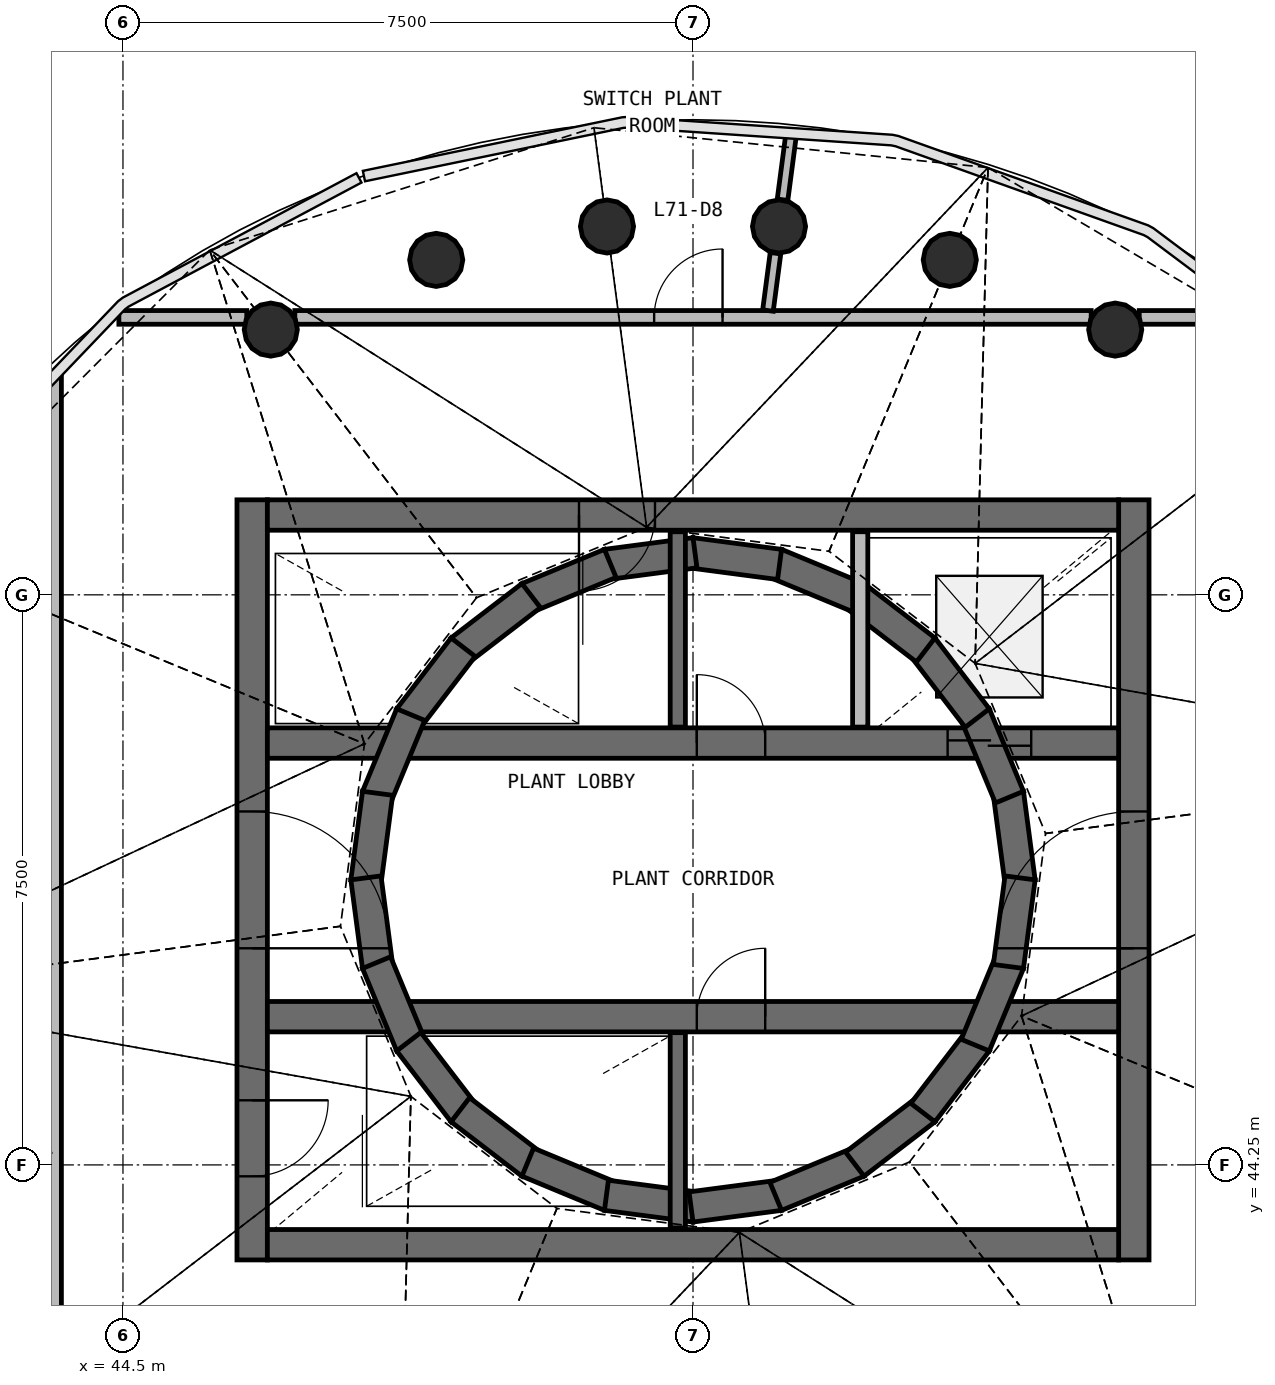
"""IFC4 building model, lengths in metres.
Left out: names, types, materials, properties, quantities, classifications, styles, units other than length and angle.
Written with IfcOpenShell. Run it as: python <this file> out.ifc"""

import sys

from ifc_helpers import new_model, si_unit, direction, frame, frame_2d, origin, origin_2d, place, context, subcontext, project, spatial, rectangle, circle, extrude, source, transform, mapped, element, fill, save


model = new_model("IFC4")
c1 = context("Model", 3, precision=1e-05, world=origin(), true_north=direction((0.0, 1.0)))
c2 = subcontext(c1, "Body", "Model", "MODEL_VIEW")
j1 = project(units=[si_unit("LENGTHUNIT", "METRE"), si_unit("PLANEANGLEUNIT", "RADIAN")], contexts=[c1])
p1 = place(None, origin())
s1 = spatial("IfcSite", under=j1, at=p1, CompositionType="ELEMENT")
p2 = place(p1, origin())
s2 = spatial("IfcBuilding", under=s1, at=p2, CompositionType="ELEMENT")
p3 = place(p2, frame((0.0, 0.0, 287.1)))
s3 = spatial("IfcBuildingStorey", under=s2, at=p3, CompositionType="ELEMENT", Elevation=287.1)
p4 = place(p3, frame((57.8, 43.0, 0.0), z_axis=(0.0, 0.0, 1.0), x_axis=(0.0, 1.0, 0.0)))
e1 = element("IfcWall", 1, at=p4, inside=s3, PredefinedType="SHEAR", context=c2, shape_type="SweptSolid", body=[
    extrude(rectangle(XDim=10.0, YDim=0.4, at=frame_2d((5.0, 0.0))), origin(), (0.0, 0.0, 1.0), 3.5),
])
p5 = place(p4, frame((4.1, 0.0, 0.0)))
e2 = element("IfcOpeningElement", 2, at=p5, cuts=e1, PredefinedType="OPENING", context=c2, shape_type="SweptSolid", body=[
    extrude(rectangle(XDim=1.8, YDim=2.1, at=frame_2d((0.9, 1.05))), frame((0.0, 0.21, 0.0), z_axis=(0.0, -1.0, 0.0), x_axis=(1.0, 0.0, 0.0)), (0.0, 0.0, 1.0), 0.42),
])
p6 = place(p3, frame((46.2, 53.0, 0.0), z_axis=(0.0, 0.0, 1.0), x_axis=(0.0, -1.0, 0.0)))
e3 = element("IfcWall", 3, at=p6, inside=s3, PredefinedType="SHEAR", context=c2, shape_type="SweptSolid", body=[
    extrude(rectangle(XDim=10.0, YDim=0.4, at=frame_2d((5.0, 0.0))), origin(), (0.0, 0.0, 1.0), 3.5),
])
p7 = place(p6, frame((4.1, 0.0, 0.0)))
e4 = element("IfcOpeningElement", 4, at=p7, cuts=e3, PredefinedType="OPENING", context=c2, shape_type="SweptSolid", body=[
    extrude(rectangle(XDim=1.8, YDim=2.1, at=frame_2d((0.9, 1.05))), frame((0.0, 0.21, 0.0), z_axis=(0.0, -1.0, 0.0), x_axis=(1.0, 0.0, 0.0)), (0.0, 0.0, 1.0), 0.42),
])
p8 = place(p6, frame((7.9, 0.0, 0.0)))
e5 = element("IfcOpeningElement", 5, at=p8, cuts=e3, PredefinedType="OPENING", context=c2, shape_type="SweptSolid", body=[
    extrude(rectangle(XDim=1.0, YDim=2.1, at=frame_2d((0.5, 1.05))), frame((0.0, 0.21, 0.0), z_axis=(0.0, -1.0, 0.0), x_axis=(1.0, 0.0, 0.0)), (0.0, 0.0, 1.0), 0.42),
])
p9 = place(p3, frame((46.4, 43.2, 0.0), z_axis=(0.0, 0.0, 1.0), x_axis=(1.0, 0.0, 0.0)))
e6 = element("IfcWall", 6, at=p9, inside=s3, PredefinedType="SHEAR", context=c2, shape_type="SweptSolid", body=[
    extrude(rectangle(XDim=11.2, YDim=0.4, at=frame_2d((5.6, 0.0))), origin(), (0.0, 0.0, 1.0), 3.5),
])
p10 = place(p3, frame((57.6, 52.8, 0.0), z_axis=(0.0, 0.0, 1.0), x_axis=(-1.0, 0.0, 0.0)))
e7 = element("IfcWall", 7, at=p10, inside=s3, PredefinedType="SHEAR", context=c2, shape_type="SweptSolid", body=[
    extrude(rectangle(XDim=11.2, YDim=0.4, at=frame_2d((5.6, 0.0))), origin(), (0.0, 0.0, 1.0), 3.5),
])
p11 = place(p10, frame((6.1, 0.0, 0.0)))
e8 = element("IfcOpeningElement", 8, at=p11, cuts=e7, PredefinedType="OPENING", context=c2, shape_type="SweptSolid", body=[
    extrude(rectangle(XDim=1.0, YDim=2.1, at=frame_2d((0.5, 1.05))), frame((0.0, 0.21, 0.0), z_axis=(0.0, -1.0, 0.0), x_axis=(1.0, 0.0, 0.0)), (0.0, 0.0, 1.0), 0.42),
])
p12 = place(p3, frame((46.4, 49.8, 0.0), z_axis=(0.0, 0.0, 1.0), x_axis=(1.0, 0.0, 0.0)))
e9 = element("IfcWall", 9, at=p12, inside=s3, PredefinedType="SHEAR", context=c2, shape_type="SweptSolid", body=[
    extrude(rectangle(XDim=11.2, YDim=0.4, at=frame_2d((5.6, 0.0))), origin(), (0.0, 0.0, 1.0), 3.5),
])
p13 = place(p12, frame((8.95, 0.0, 0.0)))
e10 = element("IfcOpeningElement", 10, at=p13, cuts=e9, PredefinedType="OPENING", context=c2, shape_type="SweptSolid", body=[
    extrude(rectangle(XDim=1.1, YDim=2.1, at=frame_2d((0.55, 1.05))), frame((0.0, 0.21, 0.0), z_axis=(0.0, -1.0, 0.0), x_axis=(1.0, 0.0, 0.0)), (0.0, 0.0, 1.0), 0.42),
])
p14 = place(p12, frame((5.65, 0.0, 0.0)))
e11 = element("IfcOpeningElement", 11, at=p14, cuts=e9, PredefinedType="OPENING", context=c2, shape_type="SweptSolid", body=[
    extrude(rectangle(XDim=0.9, YDim=2.1, at=frame_2d((0.45, 1.05))), frame((0.0, 0.21, 0.0), z_axis=(0.0, -1.0, 0.0), x_axis=(1.0, 0.0, 0.0)), (0.0, 0.0, 1.0), 0.42),
])
p15 = place(p3, frame((46.4, 46.2, 0.0), z_axis=(0.0, 0.0, 1.0), x_axis=(1.0, 0.0, 0.0)))
e12 = element("IfcWall", 12, at=p15, inside=s3, PredefinedType="SHEAR", context=c2, shape_type="SweptSolid", body=[
    extrude(rectangle(XDim=11.2, YDim=0.4, at=frame_2d((5.6, 0.0))), origin(), (0.0, 0.0, 1.0), 3.5),
])
p16 = place(p15, frame((5.65, 0.0, 0.0)))
e13 = element("IfcOpeningElement", 13, at=p16, cuts=e12, PredefinedType="OPENING", context=c2, shape_type="SweptSolid", body=[
    extrude(rectangle(XDim=0.9, YDim=2.1, at=frame_2d((0.45, 1.05))), frame((0.0, 0.21, 0.0), z_axis=(0.0, -1.0, 0.0), x_axis=(1.0, 0.0, 0.0)), (0.0, 0.0, 1.0), 0.42),
])
m1 = source(origin(), c2, "Body", "SweptSolid", [
    extrude(circle(Radius=0.35, at=origin_2d()), origin(), (0.0, 0.0, 1.0), 3.573),
])
p17 = place(p3, frame((57.555, 55.24, 0.159), z_axis=(-0.270857062246, -0.352920465817, 0.89559119951), x_axis=(0.793297249859, -0.608834520511, 0.0)))
e14 = element("IfcColumn", 14, at=p17, inside=s3, PredefinedType="COLUMN", context=c2, shape_type="MappedRepresentation", body=[
    mapped(m1, transform((0.0, 0.0, 0.0), scale=1.0)),
])
m2 = source(origin(), c2, "Body", "SweptSolid", [
    extrude(circle(Radius=0.35, at=origin_2d()), origin(), (0.0, 0.0, 1.0), 3.505),
])
p18 = place(p3, frame((55.379, 56.157, 0.146), z_axis=(-0.156165944661, -0.376971495318, 0.912964779959), x_axis=(0.923862861885, -0.382723676339, 0.0)))
e15 = element("IfcColumn", 15, at=p18, inside=s3, PredefinedType="COLUMN", context=c2, shape_type="MappedRepresentation", body=[
    mapped(m2, transform((0.0, 0.0, 0.0), scale=1.0)),
])
m3 = source(origin(), c2, "Body", "SweptSolid", [
    extrude(circle(Radius=0.35, at=origin_2d()), origin(), (0.0, 0.0, 1.0), 3.46),
])
p19 = place(p3, frame((53.132, 56.596, 0.136), z_axis=(-0.049603484084, -0.377141710425, 0.924826267266), x_axis=(0.991461239084, -0.130401730791, 0.0)))
e16 = element("IfcColumn", 16, at=p19, inside=s3, PredefinedType="COLUMN", context=c2, shape_type="MappedRepresentation", body=[
    mapped(m3, transform((0.0, 0.0, 0.0), scale=1.0)),
])
m4 = source(origin(), c2, "Body", "SweptSolid", [
    extrude(circle(Radius=0.35, at=origin_2d()), origin(), (0.0, 0.0, 1.0), 3.437),
])
p20 = place(p3, frame((50.868, 56.596, 0.131), z_axis=(0.047591855306, -0.361840165562, 0.931024548492), x_axis=(0.991460918944, 0.130404164839, 0.0)))
e17 = element("IfcColumn", 17, at=p20, inside=s3, PredefinedType="COLUMN", context=c2, shape_type="MappedRepresentation", body=[
    mapped(m4, transform((0.0, 0.0, 0.0), scale=1.0)),
])
m5 = source(origin(), c2, "Body", "SweptSolid", [
    extrude(circle(Radius=0.35, at=origin_2d()), origin(), (0.0, 0.0, 1.0), 3.426),
])
p21 = place(p3, frame((48.621, 56.157, 0.128), z_axis=(0.136544060372, -0.329743928676, 0.934143811775), x_axis=(0.923919496495, 0.382586936521, 0.0)))
e18 = element("IfcColumn", 18, at=p21, inside=s3, PredefinedType="COLUMN", context=c2, shape_type="MappedRepresentation", body=[
    mapped(m5, transform((0.0, 0.0, 0.0), scale=1.0)),
])
m6 = source(origin(), c2, "Body", "SweptSolid", [
    extrude(circle(Radius=0.35, at=origin_2d()), origin(), (0.0, 0.0, 1.0), 3.418),
])
p22 = place(p3, frame((46.445, 55.24, 0.126), z_axis=(0.214058059643, -0.278911152121, 0.9361558184), x_axis=(0.793295635134, 0.608836624455, 0.0)))
e19 = element("IfcColumn", 19, at=p22, inside=s3, PredefinedType="COLUMN", context=c2, shape_type="MappedRepresentation", body=[
    mapped(m6, transform((0.0, 0.0, 0.0), scale=1.0)),
])
m7 = source(origin(), c2, "Body", "SweptSolid", [
    extrude(circle(Radius=0.35, at=origin_2d()), origin(), (0.0, 0.0, 1.0), 3.481),
])
p23 = place(p3, frame((42.871, 51.781, 0.141), z_axis=(0.363634980693, -0.150573636171, 0.919291673467), x_axis=(0.382577370091, 0.923923457811, 0.0)))
e20 = element("IfcColumn", 20, at=p23, inside=s3, PredefinedType="COLUMN", context=c2, shape_type="MappedRepresentation", body=[
    mapped(m7, transform((0.0, 0.0, 0.0), scale=1.0)),
])
m8 = source(origin(), c2, "Body", "SweptSolid", [
    extrude(circle(Radius=0.35, at=origin_2d()), origin(), (0.0, 0.0, 1.0), 3.564),
])
p24 = place(p3, frame((41.969, 49.321, 0.157), z_axis=(0.436555493474, -0.057472157387, 0.897839769805), x_axis=(0.130522924776, 0.991445291535, 0.0)))
e21 = element("IfcColumn", 21, at=p24, inside=s3, PredefinedType="COLUMN", context=c2, shape_type="MappedRepresentation", body=[
    mapped(m8, transform((0.0, 0.0, 0.0), scale=1.0)),
])
m9 = source(origin(), c2, "Body", "SweptSolid", [
    extrude(circle(Radius=0.35, at=origin_2d()), origin(), (0.0, 0.0, 1.0), 3.67),
])
p25 = place(p3, frame((41.969, 46.679, 0.174), z_axis=(0.485581289046, 0.063923783394, 0.871851226784), x_axis=(-0.130517750651, 0.991445972691, 0.0)))
e22 = element("IfcColumn", 22, at=p25, inside=s3, PredefinedType="COLUMN", context=c2, shape_type="MappedRepresentation", body=[
    mapped(m9, transform((0.0, 0.0, 0.0), scale=1.0)),
])
m10 = source(origin(), c2, "Body", "SweptSolid", [
    extrude(circle(Radius=0.35, at=origin_2d()), origin(), (0.0, 0.0, 1.0), 3.721),
])
p26 = place(p3, frame((42.871, 44.219, 0.181), z_axis=(0.471368199064, 0.19520050003, 0.860063245174), x_axis=(-0.38260546681, 0.923911823047, 0.0)))
e23 = element("IfcColumn", 23, at=p26, inside=s3, PredefinedType="COLUMN", context=c2, shape_type="MappedRepresentation", body=[
    mapped(m10, transform((0.0, 0.0, 0.0), scale=1.0)),
])
for number, where, z_axis, x_axis in (
    (24, (56.303, 47.974, 3.5), (0.0, 0.0, 1.0), (-0.131, 0.991, 0.0)),
    (25, (56.164, 49.089, 3.5), (0.0, 0.0, 1.0), (-0.383, 0.924, 0.0)),
    (26, (55.74, 50.129, 3.5), (0.0, 0.0, 1.0), (-0.609, 0.793, 0.0)),
    (27, (55.061, 51.024, 3.5), (0.0, 0.0, 1.0), (-0.793, 0.609, 0.0)),
    (28, (54.174, 51.714, 3.5), (0.0, 0.0, 1.0), (-0.924, 0.383, 0.0)),
    (29, (53.139, 52.15, 3.5), (0.0, 0.0, 1.0), (-0.991, 0.131, 0.0)),
    (30, (52.026, 52.303, 3.5), (0.0, 0.0, 1.0), (-0.991, -0.131, 0.0)),
    (31, (50.911, 52.164, 3.5), (0.0, 0.0, 1.0), (-0.924, -0.383, 0.0)),
    (32, (49.871, 51.74, 3.5), (0.0, 0.0, 1.0), (-0.793, -0.609, 0.0)),
    (33, (48.976, 51.061, 3.5), (0.0, 0.0, 1.0), (-0.609, -0.793, 0.0)),
    (34, (48.286, 50.174, 3.5), (0.0, 0.0, 1.0), (-0.383, -0.924, 0.0)),
    (35, (47.85, 49.139, 3.5), (0.0, 0.0, 1.0), (-0.131, -0.991, 0.0)),
    (36, (47.697, 48.026, 3.5), (0.0, 0.0, 1.0), (0.131, -0.991, 0.0)),
    (37, (47.836, 46.911, 3.5), (0.0, 0.0, 1.0), (0.383, -0.924, 0.0)),
    (38, (48.26, 45.871, 3.5), (0.0, 0.0, 1.0), (0.609, -0.793, 0.0)),
    (39, (48.939, 44.976, 3.5), (0.0, 0.0, 1.0), (0.793, -0.609, 0.0)),
    (40, (49.826, 44.286, 3.5), (0.0, 0.0, 1.0), (0.924, -0.383, 0.0)),
    (41, (50.861, 43.85, 3.5), (0.0, 0.0, 1.0), (0.991, -0.131, 0.0)),
    (42, (51.974, 43.697, 3.5), (0.0, 0.0, 1.0), (0.991, 0.131, 0.0)),
    (43, (53.089, 43.836, 3.5), (0.0, 0.0, 1.0), (0.924, 0.383, 0.0)),
    (44, (54.129, 44.26, 3.5), (0.0, 0.0, 1.0), (0.793, 0.609, 0.0)),
    (45, (55.024, 44.939, 3.5), (0.0, 0.0, 1.0), (0.609, 0.793, 0.0)),
    (46, (55.714, 45.826, 3.5), (0.0, 0.0, 1.0), (0.383, 0.924, 0.0)),
    (47, (56.15, 46.861, 3.5), (0.0, 0.0, 1.0), (0.131, 0.991, 0.0)),
):
    element("IfcWall", number, at=place(p3, frame(where, z_axis=z_axis, x_axis=x_axis)), inside=s3, PredefinedType="SOLIDWALL", context=c2, shape_type="SweptSolid", body=[
        extrude(rectangle(XDim=1.175, YDim=0.4, at=frame_2d((0.587, 0.0))), origin(), (0.0, 0.0, 1.0), 2.6),
    ])
for number, where, z_axis, x_axis in (
    (48, (51.8, 43.42, 0.0), (0.0, 0.0, 1.0), (0.0, 1.0, 0.0)),
    (49, (51.8, 50.01, 0.0), (0.0, 0.0, 1.0), (0.0, 1.0, 0.0)),
    (50, (54.2, 52.58, 0.0), (0.0, 0.0, 1.0), (0.0, -1.0, 0.0)),
):
    element("IfcWall", number, at=place(p3, frame(where, z_axis=z_axis, x_axis=x_axis)), inside=s3, PredefinedType="SOLIDWALL", context=c2, shape_type="SweptSolid", body=[
        extrude(rectangle(XDim=2.57, YDim=0.2, at=frame_2d((1.285, 0.0))), origin(), (0.0, 0.0, 1.0), 2.5),
    ])
p27 = place(p3, frame((43.6, 54.677, 0.0), z_axis=(0.0, 0.0, 1.0), x_axis=(0.0, -1.0, 0.0)))
e51 = element("IfcWall", 51, at=p27, inside=s3, PredefinedType="PARTITIONING", context=c2, shape_type="SweptSolid", body=[
    extrude(rectangle(XDim=13.354, YDim=0.18, at=frame_2d((6.677, 0.0))), origin(), (0.0, 0.0, 1.0), 2.62),
])
p28 = place(p3, frame((46.761, 55.4, 0.0), z_axis=(0.0, 0.0, 1.0), x_axis=(1.0, 0.0, 0.0)))
e52 = element("IfcWall", 52, at=p28, inside=s3, PredefinedType="PARTITIONING", context=c2, shape_type="SweptSolid", body=[
    extrude(rectangle(XDim=10.478, YDim=0.18, at=frame_2d((5.239, 0.0))), origin(), (0.0, 0.0, 1.0), 2.62),
])
p29 = place(p28, frame((4.728, 0.0, 0.0)))
e53 = element("IfcOpeningElement", 53, at=p29, cuts=e52, PredefinedType="OPENING", context=c2, shape_type="SweptSolid", body=[
    extrude(rectangle(XDim=0.9, YDim=2.1, at=frame_2d((0.45, 1.05))), frame((0.0, 0.1, 0.0), z_axis=(0.0, -1.0, 0.0), x_axis=(1.0, 0.0, 0.0)), (0.0, 0.0, 1.0), 0.2),
])
for number, where, z_axis, x_axis in (
    (54, (46.129, 55.4, 0.0), (0.0, 0.0, 1.0), (-1.0, 0.0, 0.0)),
    (55, (59.554, 55.4, 0.0), (0.0, 0.0, 1.0), (-1.0, 0.0, 0.0)),
):
    element("IfcWall", number, at=place(p3, frame(where, z_axis=z_axis, x_axis=x_axis)), inside=s3, PredefinedType="PARTITIONING", context=c2, shape_type="SweptSolid", body=[
        extrude(rectangle(XDim=1.682, YDim=0.18, at=frame_2d((0.841, 0.0))), origin(), (0.0, 0.0, 1.0), 2.62),
    ])
p30 = place(p3, frame((53.178, 56.948, 0.0), z_axis=(0.0, 0.0, 1.0), x_axis=(0.130647017199, 0.991428946973, 0.0)))
e56 = element("IfcWall", 56, at=p30, inside=s3, PredefinedType="PARTITIONING", context=c2, shape_type="SweptSolid", body=[
    extrude(rectangle(XDim=0.886, YDim=0.14, at=frame_2d((0.443, 0.0))), origin(), (0.0, 0.0, 1.0), 2.62),
])
p31 = place(p3, frame((52.986, 55.49, 0.0), z_axis=(0.0, 0.0, 1.0), x_axis=(0.130587308426, 0.991436813356, 0.0)))
e57 = element("IfcWall", 57, at=p31, inside=s3, PredefinedType="PARTITIONING", context=c2, shape_type="SweptSolid", body=[
    extrude(rectangle(XDim=0.761, YDim=0.14, at=frame_2d((0.38, 0.0))), origin(), (0.0, 0.0, 1.0), 2.62),
])
m11 = source(origin(), c2, "Body", "SweptSolid", [
    extrude(rectangle(XDim=1.8, YDim=2.1, at=frame_2d((0.9, 1.05))), frame((0.0, 0.025, 0.0), z_axis=(0.0, -1.0, 0.0), x_axis=(1.0, 0.0, 0.0)), (0.0, 0.0, 1.0), 0.05),
])
p32 = place(p7, origin())
e58 = element("IfcDoor", 58, at=p32, inside=s3, OperationType="SINGLE_SWING_RIGHT", PredefinedType="DOOR", context=c2, shape_type="MappedRepresentation", body=[
    mapped(m11, transform((0.0, 0.0, 0.0), scale=1.0)),
])
fill(e4, e58)
p33 = place(p5, origin())
e59 = element("IfcDoor", 59, at=p33, inside=s3, OperationType="SINGLE_SWING_LEFT", PredefinedType="DOOR", context=c2, shape_type="MappedRepresentation", body=[
    mapped(m11, transform((0.0, 0.0, 0.0), scale=1.0)),
])
fill(e2, e59)
m12 = source(origin(), c2, "Body", "SweptSolid", [
    extrude(rectangle(XDim=1.0, YDim=2.1, at=frame_2d((0.5, 1.05))), frame((0.0, 0.025, 0.0), z_axis=(0.0, -1.0, 0.0), x_axis=(1.0, 0.0, 0.0)), (0.0, 0.0, 1.0), 0.05),
])
p34 = place(p11, origin())
e60 = element("IfcDoor", 60, at=p34, inside=s3, OperationType="SINGLE_SWING_RIGHT", PredefinedType="DOOR", context=c2, shape_type="MappedRepresentation", body=[
    mapped(m12, transform((0.0, 0.0, 0.0), scale=1.0)),
])
fill(e8, e60)
p35 = place(p8, origin())
e61 = element("IfcDoor", 61, at=p35, inside=s3, OperationType="SINGLE_SWING_LEFT", PredefinedType="DOOR", context=c2, shape_type="MappedRepresentation", body=[
    mapped(m12, transform((0.0, 0.0, 0.0), scale=1.0)),
])
fill(e5, e61)
m13 = source(origin(), c2, "Body", "SweptSolid", [
    extrude(rectangle(XDim=1.1, YDim=2.1, at=frame_2d((0.55, 1.05))), frame((0.0, 0.025, 0.0), z_axis=(0.0, -1.0, 0.0), x_axis=(1.0, 0.0, 0.0)), (0.0, 0.0, 1.0), 0.05),
])
p36 = place(p13, origin())
e62 = element("IfcDoor", 62, at=p36, inside=s3, OperationType="DOUBLE_DOOR_SLIDING", PredefinedType="USERDEFINED", context=c2, shape_type="MappedRepresentation", body=[
    mapped(m13, transform((0.0, 0.0, 0.0), scale=1.0)),
])
fill(e10, e62)
m14 = source(origin(), c2, "Body", "SweptSolid", [
    extrude(rectangle(XDim=0.9, YDim=2.1, at=frame_2d((0.45, 1.05))), frame((0.0, 0.025, 0.0), z_axis=(0.0, -1.0, 0.0), x_axis=(1.0, 0.0, 0.0)), (0.0, 0.0, 1.0), 0.05),
])
p37 = place(p29, origin())
e63 = element("IfcDoor", 63, at=p37, inside=s3, OperationType="SINGLE_SWING_RIGHT", PredefinedType="DOOR", context=c2, shape_type="MappedRepresentation", body=[
    mapped(m14, transform((0.0, 0.0, 0.0), scale=1.0)),
])
fill(e53, e63)
m15 = source(origin(), c2, "Body", "SweptSolid", [
    extrude(rectangle(XDim=0.9, YDim=2.1, at=frame_2d((0.45, 1.05))), frame((0.0, 0.025, 0.0), z_axis=(0.0, -1.0, 0.0), x_axis=(1.0, 0.0, 0.0)), (0.0, 0.0, 1.0), 0.05),
])
p38 = place(p14, origin())
e64 = element("IfcDoor", 64, at=p38, inside=s3, OperationType="SINGLE_SWING_LEFT", PredefinedType="DOOR", context=c2, shape_type="MappedRepresentation", body=[
    mapped(m15, transform((0.0, 0.0, 0.0), scale=1.0)),
])
fill(e11, e64)
p39 = place(p16, origin())
e65 = element("IfcDoor", 65, at=p39, inside=s3, OperationType="SINGLE_SWING_RIGHT", PredefinedType="DOOR", context=c2, shape_type="MappedRepresentation", body=[
    mapped(m15, transform((0.0, 0.0, 0.0), scale=1.0)),
])
fill(e13, e65)
save(model, sys.argv[1])
